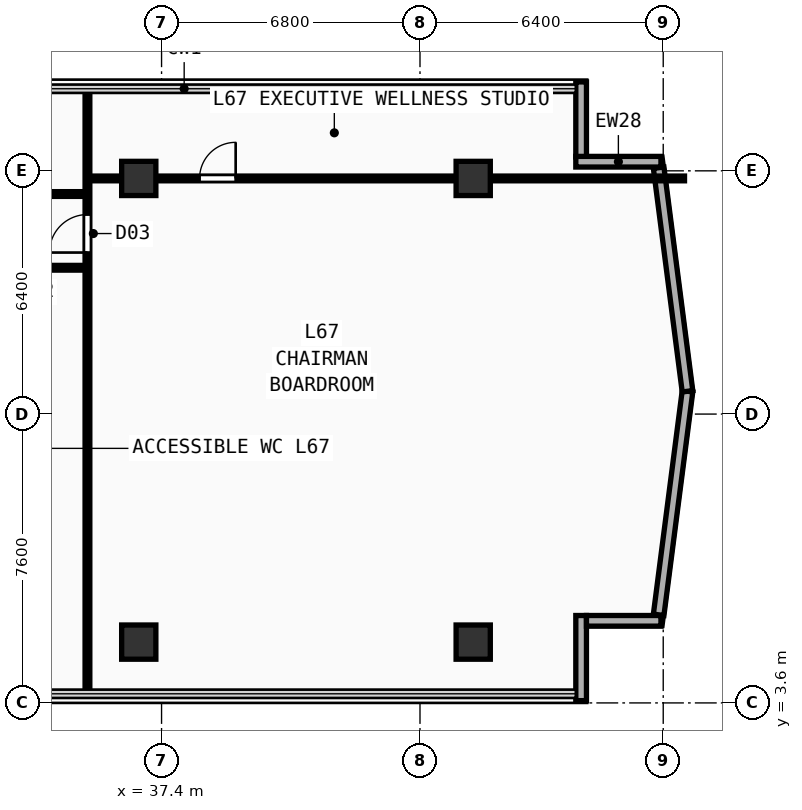
"""IFC4 building model, lengths in metres.
Left out: names, types, materials, properties, quantities, classifications, styles, units other than length and angle.
Written with IfcOpenShell. Run it as: python <this file> out.ifc"""

import sys

from ifc_helpers import new_model, si_unit, direction, frame, frame_2d, origin, origin_2d, place, context, subcontext, project, spatial, rectangle, extrude, element, fill, save


model = new_model("IFC4")
c1 = context("Model", 3, precision=1e-05, world=origin(), true_north=direction((0.0, 1.0)))
c2 = subcontext(c1, "Body", "Model", "MODEL_VIEW")
j1 = project(units=[si_unit("LENGTHUNIT", "METRE"), si_unit("PLANEANGLEUNIT", "RADIAN")], contexts=[c1])
p1 = place(None, origin())
s1 = spatial("IfcSite", under=j1, at=p1, CompositionType="ELEMENT")
p2 = place(p1, origin())
s2 = spatial("IfcBuilding", under=s1, at=p2, CompositionType="ELEMENT")
p3 = place(p2, frame((0.0, 0.0, 262.8)))
s3 = spatial("IfcBuildingStorey", under=s2, at=p3, CompositionType="ELEMENT", Elevation=262.8)
for number, where, z_axis, x_axis in (
    (1, (36.8, 5.2, 0.0), (0.0, 0.0, 1.0), (1.0, 0.0, 0.0)),
    (2, (45.6, 5.2, 0.0), (0.0, 0.0, 1.0), (1.0, 0.0, 0.0)),
    (3, (36.8, 17.4, 0.0), (0.0, 0.0, 1.0), (1.0, 0.0, 0.0)),
    (4, (45.6, 17.4, 0.0), (0.0, 0.0, 1.0), (1.0, 0.0, 0.0)),
):
    element("IfcColumn", number, at=place(p3, frame(where, z_axis=z_axis, x_axis=x_axis)), inside=s3, PredefinedType="COLUMN", context=c2, shape_type="SweptSolid", body=[
        extrude(rectangle(XDim=0.9, YDim=0.9, at=origin_2d()), origin(), (0.0, 0.0, 1.0), 3.56),
    ])
p4 = place(p3, frame((48.44, 3.66, 0.0), z_axis=(0.0, 0.0, 1.0), x_axis=(0.0, 1.0, 0.0)))
e5 = element("IfcWall", 5, at=p4, inside=s3, PredefinedType="SOLIDWALL", context=c2, shape_type="SweptSolid", body=[
    extrude(rectangle(XDim=2.24, YDim=0.28, at=frame_2d((1.12, 0.0))), origin(), (0.0, 0.0, 1.0), 3.56),
])
p5 = place(p3, frame((48.58, 5.76, 0.0), z_axis=(0.0, 0.0, 1.0), x_axis=(1.0, 0.0, 0.0)))
e6 = element("IfcWall", 6, at=p5, inside=s3, PredefinedType="SOLIDWALL", context=c2, shape_type="SweptSolid", body=[
    extrude(rectangle(XDim=1.96, YDim=0.28, at=frame_2d((0.98, 0.0))), origin(), (0.0, 0.0, 1.0), 3.56),
])
p6 = place(p3, frame((48.44, 17.965, 0.0), z_axis=(0.0, 0.0, 1.0), x_axis=(0.0, 1.0, 0.0)))
e7 = element("IfcWall", 7, at=p6, inside=s3, PredefinedType="SOLIDWALL", context=c2, shape_type="SweptSolid", body=[
    extrude(rectangle(XDim=1.975, YDim=0.28, at=frame_2d((0.987, 0.0))), origin(), (0.0, 0.0, 1.0), 3.56),
])
p7 = place(p3, frame((48.3, 17.84, 0.0), z_axis=(0.0, 0.0, 1.0), x_axis=(1.0, 0.0, 0.0)))
e8 = element("IfcWall", 8, at=p7, inside=s3, PredefinedType="SOLIDWALL", context=c2, shape_type="SweptSolid", body=[
    extrude(rectangle(XDim=2.24, YDim=0.28, at=frame_2d((1.12, 0.0))), origin(), (0.0, 0.0, 1.0), 3.56),
])
for number, where, z_axis, x_axis in (
    (9, (50.48, 5.918, 0.0), (0.0, 0.0, 1.0), (0.128, 0.992, 0.0)),
    (10, (51.239, 11.799, 0.0), (0.0, 0.0, 1.0), (-0.128, 0.992, 0.0)),
):
    element("IfcWall", number, at=place(p3, frame(where, z_axis=z_axis, x_axis=x_axis)), inside=s3, PredefinedType="SOLIDWALL", context=c2, shape_type="SweptSolid", body=[
        extrude(rectangle(XDim=5.931, YDim=0.28, at=frame_2d((2.966, 0.0))), origin(), (0.0, 0.0, 1.0), 3.56),
    ])
p8 = place(p3, frame((29.4, 15.05, 0.0), z_axis=(0.0, 0.0, 1.0), x_axis=(1.0, 0.0, 0.0)))
e11 = element("IfcWall", 11, at=p8, inside=s3, PredefinedType="PARTITIONING", context=c2, shape_type="SweptSolid", body=[
    extrude(rectangle(XDim=6.05, YDim=0.125, at=frame_2d((3.025, 0.0))), origin(), (0.0, 0.0, 1.0), 3.56),
])
p9 = place(p8, frame((2.002, 0.0, 0.0)))
e12 = element("IfcOpeningElement", 12, at=p9, cuts=e11, PredefinedType="OPENING", context=c2, shape_type="SweptSolid", body=[
    extrude(rectangle(XDim=0.95, YDim=2.15, at=frame_2d((0.475, 1.075))), frame((0.0, 0.073, 0.0), z_axis=(0.0, -1.0, 0.0), x_axis=(1.0, 0.0, 0.0)), (0.0, 0.0, 1.0), 0.145),
])
p10 = place(p3, frame((35.45, 3.84, 0.0), z_axis=(0.0, 0.0, 1.0), x_axis=(0.0, 1.0, 0.0)))
e13 = element("IfcWall", 13, at=p10, inside=s3, PredefinedType="PARTITIONING", context=c2, shape_type="SweptSolid", body=[
    extrude(rectangle(XDim=15.92, YDim=0.125, at=frame_2d((7.96, 0.0))), origin(), (0.0, 0.0, 1.0), 3.56),
])
p11 = place(p10, frame((11.61, 0.0, 0.0)))
e14 = element("IfcOpeningElement", 14, at=p11, cuts=e13, PredefinedType="OPENING", context=c2, shape_type="SweptSolid", body=[
    extrude(rectangle(XDim=1.0, YDim=2.2, at=frame_2d((0.5, 1.1))), frame((0.0, 0.073, 0.0), z_axis=(0.0, -1.0, 0.0), x_axis=(1.0, 0.0, 0.0)), (0.0, 0.0, 1.0), 0.145),
])
p12 = place(p3, frame((35.45, 17.4, 0.0), z_axis=(0.0, 0.0, 1.0), x_axis=(1.0, 0.0, 0.0)))
e15 = element("IfcWall", 15, at=p12, inside=s3, PredefinedType="PARTITIONING", context=c2, shape_type="SweptSolid", body=[
    extrude(rectangle(XDim=15.71, YDim=0.125, at=frame_2d((7.855, 0.0))), origin(), (0.0, 0.0, 1.0), 3.2),
])
p13 = place(p12, frame((2.95, 0.0, 0.0)))
e16 = element("IfcOpeningElement", 16, at=p13, cuts=e15, PredefinedType="OPENING", context=c2, shape_type="SweptSolid", body=[
    extrude(rectangle(XDim=0.95, YDim=2.15, at=frame_2d((0.475, 1.075))), frame((0.0, 0.073, 0.0), z_axis=(0.0, -1.0, 0.0), x_axis=(1.0, 0.0, 0.0)), (0.0, 0.0, 1.0), 0.145),
])
p14 = place(p3, frame((23.65, 16.99, 0.0), z_axis=(0.0, 0.0, 1.0), x_axis=(1.0, 0.0, 0.0)))
e17 = element("IfcWall", 17, at=p14, inside=s3, PredefinedType="PARTITIONING", context=c2, shape_type="SweptSolid", body=[
    extrude(rectangle(XDim=11.8, YDim=0.125, at=frame_2d((5.9, 0.0))), origin(), (0.0, 0.0, 1.0), 3.56),
])
p15 = place(p14, frame((1.683, 0.0, 0.0)))
e18 = element("IfcOpeningElement", 18, at=p15, cuts=e17, PredefinedType="OPENING", context=c2, shape_type="SweptSolid", body=[
    extrude(rectangle(XDim=0.95, YDim=2.15, at=frame_2d((0.475, 1.075))), frame((0.0, 0.073, 0.0), z_axis=(0.0, -1.0, 0.0), x_axis=(1.0, 0.0, 0.0)), (0.0, 0.0, 1.0), 0.145),
])
p16 = place(p14, frame((7.725, 0.0, 0.0)))
e19 = element("IfcOpeningElement", 19, at=p16, cuts=e17, PredefinedType="OPENING", context=c2, shape_type="SweptSolid", body=[
    extrude(rectangle(XDim=0.95, YDim=2.15, at=frame_2d((0.475, 1.075))), frame((0.0, 0.073, 0.0), z_axis=(0.0, -1.0, 0.0), x_axis=(1.0, 0.0, 0.0)), (0.0, 0.0, 1.0), 0.145),
])
p17 = place(p11, origin())
e20 = element("IfcDoor", 20, at=p17, inside=s3, OperationType="SINGLE_SWING_LEFT", PredefinedType="DOOR", context=c2, shape_type="SweptSolid", body=[
    extrude(rectangle(XDim=1.0, YDim=2.2, at=frame_2d((0.5, 1.1))), frame((0.0, 0.025, 0.0), z_axis=(0.0, -1.0, 0.0), x_axis=(1.0, 0.0, 0.0)), (0.0, 0.0, 1.0), 0.05),
])
fill(e14, e20)
p18 = place(p13, origin())
e21 = element("IfcDoor", 21, at=p18, inside=s3, OperationType="SINGLE_SWING_RIGHT", PredefinedType="DOOR", context=c2, shape_type="SweptSolid", body=[
    extrude(rectangle(XDim=0.95, YDim=2.15, at=frame_2d((0.475, 1.075))), frame((0.0, 0.025, 0.0), z_axis=(0.0, -1.0, 0.0), x_axis=(1.0, 0.0, 0.0)), (0.0, 0.0, 1.0), 0.05),
])
fill(e16, e21)
save(model, sys.argv[1])
